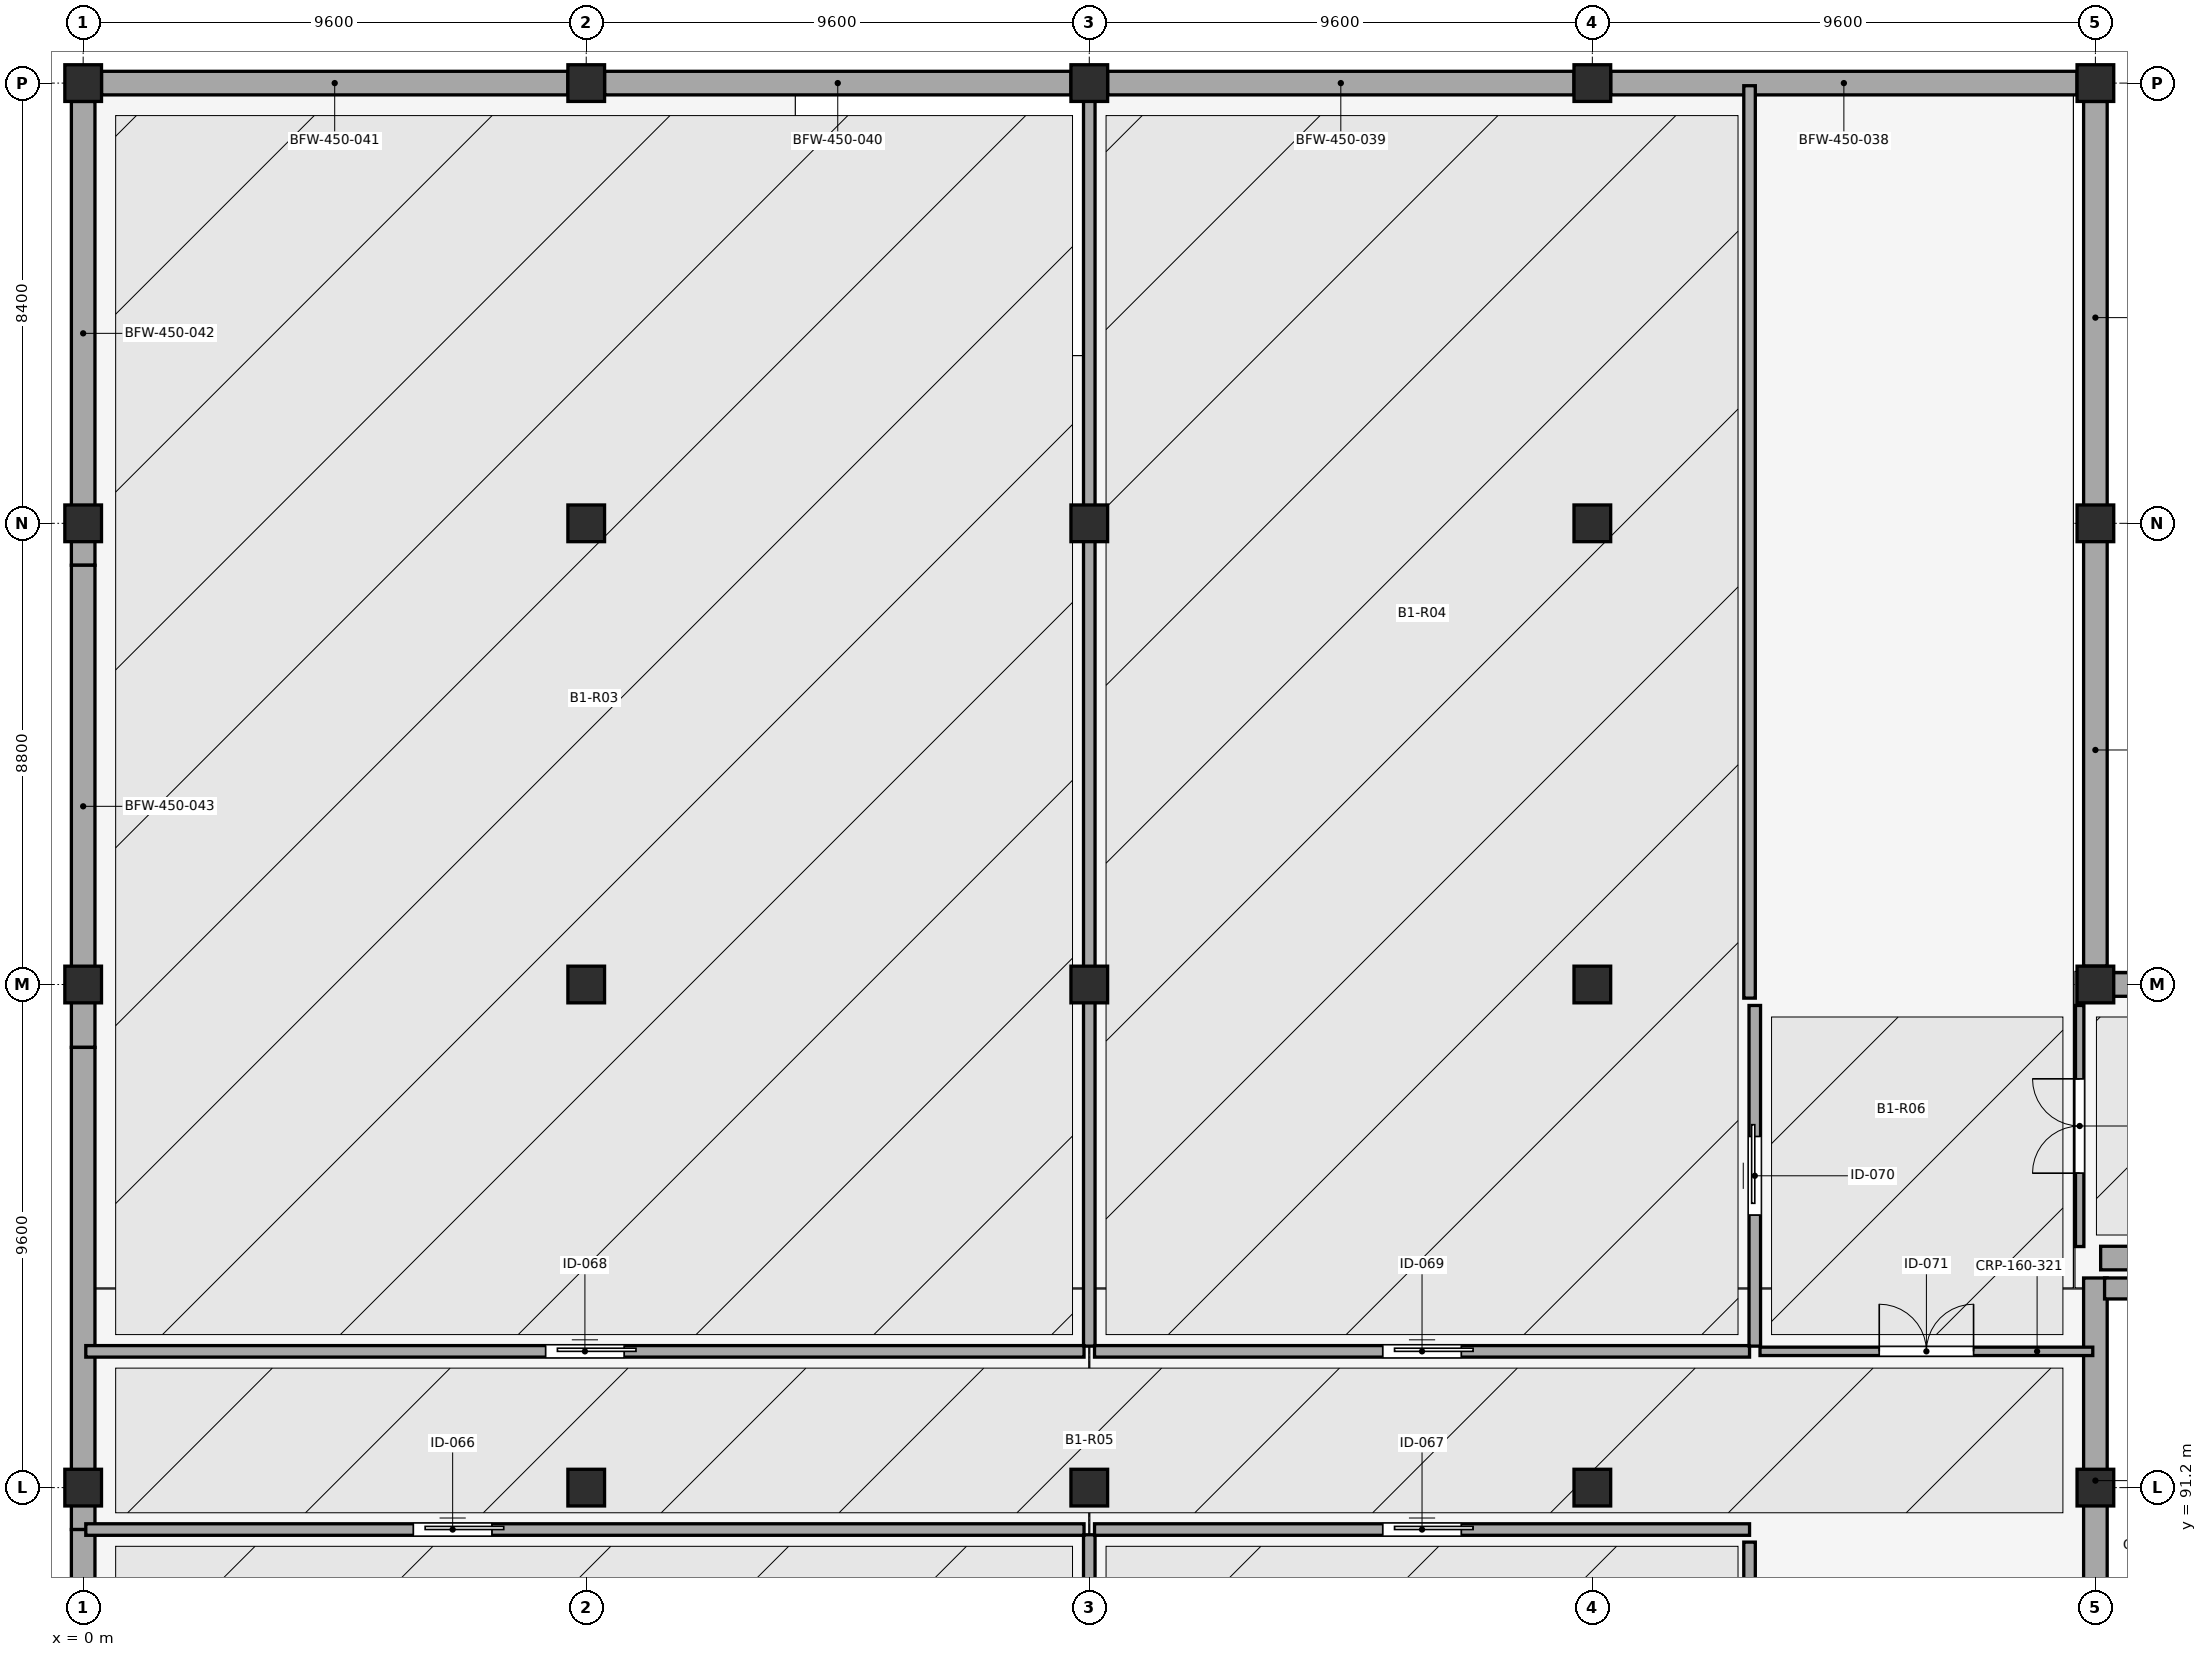
"""IFC4 building model, lengths in metres.
Left out: names, types, materials, properties, quantities, classifications, styles, units other than length and angle.
Written with IfcOpenShell. Run it as: python <this file> out.ifc"""

import sys

from ifc_helpers import new_model, si_unit, direction, frame, frame_2d, origin, origin_2d, place, context, subcontext, project, spatial, rectangle, extrude, element, fill, save


model = new_model("IFC4")
c1 = context("Model", 3, precision=1e-05, world=origin(), true_north=direction((0.0, 1.0)))
c2 = subcontext(c1, "Body", "Model", "MODEL_VIEW")
j1 = project(units=[si_unit("LENGTHUNIT", "METRE"), si_unit("PLANEANGLEUNIT", "RADIAN")], contexts=[c1])
p1 = place(None, origin())
s1 = spatial("IfcSite", under=j1, at=p1, CompositionType="ELEMENT")
p2 = place(p1, origin())
s2 = spatial("IfcBuilding", under=s1, at=p2, CompositionType="ELEMENT")
p3 = place(p2, frame((0.0, 0.0, -4.2)))
s3 = spatial("IfcBuildingStorey", under=s2, at=p3, CompositionType="ELEMENT", Elevation=-4.2)
for number, where, z_axis, x_axis in (
    (1, (0.0, 91.2, 0.0), (0.0, 0.0, 1.0), (1.0, 0.0, 0.0)),
    (2, (0.0, 100.8, 0.0), (0.0, 0.0, 1.0), (1.0, 0.0, 0.0)),
    (3, (0.0, 109.6, 0.0), (0.0, 0.0, 1.0), (1.0, 0.0, 0.0)),
    (4, (0.0, 118.0, 0.0), (0.0, 0.0, 1.0), (1.0, 0.0, 0.0)),
    (5, (9.6, 91.2, 0.0), (0.0, 0.0, 1.0), (1.0, 0.0, 0.0)),
    (6, (9.6, 100.8, 0.0), (0.0, 0.0, 1.0), (1.0, 0.0, 0.0)),
    (7, (9.6, 109.6, 0.0), (0.0, 0.0, 1.0), (1.0, 0.0, 0.0)),
    (8, (9.6, 118.0, 0.0), (0.0, 0.0, 1.0), (1.0, 0.0, 0.0)),
    (9, (19.2, 91.2, 0.0), (0.0, 0.0, 1.0), (1.0, 0.0, 0.0)),
    (10, (19.2, 100.8, 0.0), (0.0, 0.0, 1.0), (1.0, 0.0, 0.0)),
    (11, (19.2, 109.6, 0.0), (0.0, 0.0, 1.0), (1.0, 0.0, 0.0)),
    (12, (19.2, 118.0, 0.0), (0.0, 0.0, 1.0), (1.0, 0.0, 0.0)),
    (13, (28.8, 91.2, 0.0), (0.0, 0.0, 1.0), (1.0, 0.0, 0.0)),
    (14, (28.8, 100.8, 0.0), (0.0, 0.0, 1.0), (1.0, 0.0, 0.0)),
    (15, (28.8, 109.6, 0.0), (0.0, 0.0, 1.0), (1.0, 0.0, 0.0)),
    (16, (28.8, 118.0, 0.0), (0.0, 0.0, 1.0), (1.0, 0.0, 0.0)),
    (17, (38.4, 91.2, 0.0), (0.0, 0.0, 1.0), (1.0, 0.0, 0.0)),
    (18, (38.4, 100.8, 0.0), (0.0, 0.0, 1.0), (1.0, 0.0, 0.0)),
    (19, (38.4, 109.6, 0.0), (0.0, 0.0, 1.0), (1.0, 0.0, 0.0)),
    (20, (38.4, 118.0, 0.0), (0.0, 0.0, 1.0), (1.0, 0.0, 0.0)),
):
    element("IfcColumn", number, at=place(p3, frame(where, z_axis=z_axis, x_axis=x_axis)), inside=s3, PredefinedType="COLUMN", context=c2, shape_type="SweptSolid", body=[
        extrude(rectangle(XDim=0.7, YDim=0.7, at=origin_2d()), origin(), (0.0, 0.0, 1.0), 4.2),
    ])
p4 = place(p3, frame((38.4, 87.467, 0.0), z_axis=(0.0, 0.0, 1.0), x_axis=(0.0, 1.0, 0.0)))
e21 = element("IfcWall", 21, at=p4, inside=s3, PredefinedType="SOLIDWALL", context=c2, shape_type="SweptSolid", body=[
    extrude(rectangle(XDim=7.733, YDim=0.45, at=frame_2d((3.866, 0.0))), origin(), (0.0, 0.0, 1.0), 3.84),
])
for number, where, z_axis, x_axis in (
    (22, (38.4, 101.15, 0.0), (0.0, 0.0, 1.0), (0.0, 1.0, 0.0)),
    (23, (38.4, 109.4, 0.0), (0.0, 0.0, 1.0), (0.0, 1.0, 0.0)),
):
    element("IfcWall", number, at=place(p3, frame(where, z_axis=z_axis, x_axis=x_axis)), inside=s3, PredefinedType="SOLIDWALL", context=c2, shape_type="SweptSolid", body=[
        extrude(rectangle(XDim=8.25, YDim=0.45, at=frame_2d((4.125, 0.0))), origin(), (0.0, 0.0, 1.0), 3.84),
    ])
p5 = place(p3, frame((38.05, 118.0, 0.0), z_axis=(0.0, 0.0, 1.0), x_axis=(-1.0, 0.0, 0.0)))
e24 = element("IfcWall", 24, at=p5, inside=s3, PredefinedType="SOLIDWALL", context=c2, shape_type="SweptSolid", body=[
    extrude(rectangle(XDim=8.9, YDim=0.45, at=frame_2d((4.45, 0.0))), origin(), (0.0, 0.0, 1.0), 3.84),
])
p6 = place(p3, frame((28.45, 118.0, 0.0), z_axis=(0.0, 0.0, 1.0), x_axis=(-1.0, 0.0, 0.0)))
e25 = element("IfcWall", 25, at=p6, inside=s3, PredefinedType="SOLIDWALL", context=c2, shape_type="SweptSolid", body=[
    extrude(rectangle(XDim=8.9, YDim=0.45, at=frame_2d((4.45, 0.0))), origin(), (0.0, 0.0, 1.0), 3.84),
])
p7 = place(p3, frame((18.85, 118.0, 0.0), z_axis=(0.0, 0.0, 1.0), x_axis=(-1.0, 0.0, 0.0)))
e26 = element("IfcWall", 26, at=p7, inside=s3, PredefinedType="SOLIDWALL", context=c2, shape_type="SweptSolid", body=[
    extrude(rectangle(XDim=8.9, YDim=0.45, at=frame_2d((4.45, 0.0))), origin(), (0.0, 0.0, 1.0), 3.84),
])
p8 = place(p3, frame((9.25, 118.0, 0.0), z_axis=(0.0, 0.0, 1.0), x_axis=(-1.0, 0.0, 0.0)))
e27 = element("IfcWall", 27, at=p8, inside=s3, PredefinedType="SOLIDWALL", context=c2, shape_type="SweptSolid", body=[
    extrude(rectangle(XDim=8.9, YDim=0.45, at=frame_2d((4.45, 0.0))), origin(), (0.0, 0.0, 1.0), 3.84),
])
p9 = place(p3, frame((0.0, 117.65, 0.0), z_axis=(0.0, 0.0, 1.0), x_axis=(0.0, -1.0, 0.0)))
e28 = element("IfcWall", 28, at=p9, inside=s3, PredefinedType="SOLIDWALL", context=c2, shape_type="SweptSolid", body=[
    extrude(rectangle(XDim=8.85, YDim=0.45, at=frame_2d((4.425, 0.0))), origin(), (0.0, 0.0, 1.0), 3.84),
])
p10 = place(p3, frame((0.0, 108.8, 0.0), z_axis=(0.0, 0.0, 1.0), x_axis=(0.0, -1.0, 0.0)))
e29 = element("IfcWall", 29, at=p10, inside=s3, PredefinedType="SOLIDWALL", context=c2, shape_type="SweptSolid", body=[
    extrude(rectangle(XDim=9.2, YDim=0.45, at=frame_2d((4.6, 0.0))), origin(), (0.0, 0.0, 1.0), 3.84),
])
p11 = place(p3, frame((0.0, 99.6, 0.0), z_axis=(0.0, 0.0, 1.0), x_axis=(0.0, -1.0, 0.0)))
e30 = element("IfcWall", 30, at=p11, inside=s3, PredefinedType="SOLIDWALL", context=c2, shape_type="SweptSolid", body=[
    extrude(rectangle(XDim=9.2, YDim=0.45, at=frame_2d((4.6, 0.0))), origin(), (0.0, 0.0, 1.0), 3.84),
])
p12 = place(p3, frame((0.0, 90.4, 0.0), z_axis=(0.0, 0.0, 1.0), x_axis=(0.0, -1.0, 0.0)))
e31 = element("IfcWall", 31, at=p12, inside=s3, PredefinedType="SOLIDWALL", context=c2, shape_type="SweptSolid", body=[
    extrude(rectangle(XDim=9.2, YDim=0.45, at=frame_2d((4.6, 0.0))), origin(), (0.0, 0.0, 1.0), 3.84),
])
for number, where, z_axis, x_axis in (
    (32, (38.5, 95.58, 0.0), (0.0, 0.0, 1.0), (1.0, 0.0, 0.0)),
    (33, (38.5, 100.8, 0.0), (0.0, 0.0, 1.0), (1.0, 0.0, 0.0)),
):
    element("IfcWall", number, at=place(p3, frame(where, z_axis=z_axis, x_axis=x_axis)), inside=s3, PredefinedType="SOLIDWALL", context=c2, shape_type="SweptSolid", body=[
        extrude(rectangle(XDim=9.4, YDim=0.45, at=frame_2d((4.7, 0.0))), origin(), (0.0, 0.0, 1.0), 3.84),
    ])
p13 = place(p3, frame((38.575, 95.0, 0.0), z_axis=(0.0, 0.0, 1.0), x_axis=(1.0, 0.0, 0.0)))
e34 = element("IfcWall", 34, at=p13, inside=s3, PredefinedType="SOLIDWALL", context=c2, shape_type="SweptSolid", body=[
    extrude(rectangle(XDim=9.25, YDim=0.4, at=frame_2d((4.625, 0.0))), origin(), (0.0, 0.0, 1.0), 9.0),
])
p14 = place(p3, frame((19.2, 72.05, 0.0), z_axis=(0.0, 0.0, 1.0), x_axis=(0.0, 1.0, 0.0)))
e35 = element("IfcWall", 35, at=p14, inside=s3, PredefinedType="PARTITIONING", context=c2, shape_type="SweptSolid", body=[
    extrude(rectangle(XDim=18.25, YDim=0.22, at=frame_2d((9.125, 0.0))), origin(), (0.0, 0.0, 1.0), 2.952),
])
p15 = place(p3, frame((0.05, 90.4, 0.0), z_axis=(0.0, 0.0, 1.0), x_axis=(1.0, 0.0, 0.0)))
e36 = element("IfcWall", 36, at=p15, inside=s3, PredefinedType="PARTITIONING", context=c2, shape_type="SweptSolid", body=[
    extrude(rectangle(XDim=19.05, YDim=0.22, at=frame_2d((9.525, 0.0))), origin(), (0.0, 0.0, 1.0), 3.84),
])
p16 = place(p15, frame((6.251, 0.0, 0.0)))
e37 = element("IfcOpeningElement", 37, at=p16, cuts=e36, PredefinedType="OPENING", context=c2, shape_type="SweptSolid", body=[
    extrude(rectangle(XDim=1.5, YDim=2.2, at=frame_2d((0.75, 1.1))), frame((0.0, 0.12, 0.0), z_axis=(0.0, -1.0, 0.0), x_axis=(1.0, 0.0, 0.0)), (0.0, 0.0, 1.0), 0.24),
])
p17 = place(p3, frame((19.3, 90.4, 0.0), z_axis=(0.0, 0.0, 1.0), x_axis=(1.0, 0.0, 0.0)))
e38 = element("IfcWall", 38, at=p17, inside=s3, PredefinedType="PARTITIONING", context=c2, shape_type="SweptSolid", body=[
    extrude(rectangle(XDim=12.5, YDim=0.22, at=frame_2d((6.25, 0.0))), origin(), (0.0, 0.0, 1.0), 3.84),
])
p18 = place(p17, frame((5.5, 0.0, 0.0)))
e39 = element("IfcOpeningElement", 39, at=p18, cuts=e38, PredefinedType="OPENING", context=c2, shape_type="SweptSolid", body=[
    extrude(rectangle(XDim=1.5, YDim=2.2, at=frame_2d((0.75, 1.1))), frame((0.0, 0.12, 0.0), z_axis=(0.0, -1.0, 0.0), x_axis=(1.0, 0.0, 0.0)), (0.0, 0.0, 1.0), 0.24),
])
p19 = place(p3, frame((19.2, 93.9, 0.0), z_axis=(0.0, 0.0, 1.0), x_axis=(0.0, 1.0, 0.0)))
e40 = element("IfcWall", 40, at=p19, inside=s3, PredefinedType="PARTITIONING", context=c2, shape_type="SweptSolid", body=[
    extrude(rectangle(XDim=24.05, YDim=0.22, at=frame_2d((12.025, 0.0))), origin(), (0.0, 0.0, 1.0), 2.952),
])
p20 = place(p3, frame((0.05, 93.8, 0.0), z_axis=(0.0, 0.0, 1.0), x_axis=(1.0, 0.0, 0.0)))
e41 = element("IfcWall", 41, at=p20, inside=s3, PredefinedType="PARTITIONING", context=c2, shape_type="SweptSolid", body=[
    extrude(rectangle(XDim=19.05, YDim=0.22, at=frame_2d((9.525, 0.0))), origin(), (0.0, 0.0, 1.0), 3.84),
])
p21 = place(p20, frame((8.775, 0.0, 0.0)))
e42 = element("IfcOpeningElement", 42, at=p21, cuts=e41, PredefinedType="OPENING", context=c2, shape_type="SweptSolid", body=[
    extrude(rectangle(XDim=1.5, YDim=2.2, at=frame_2d((0.75, 1.1))), frame((0.0, 0.12, 0.0), z_axis=(0.0, -1.0, 0.0), x_axis=(1.0, 0.0, 0.0)), (0.0, 0.0, 1.0), 0.24),
])
p22 = place(p3, frame((19.3, 93.8, 0.0), z_axis=(0.0, 0.0, 1.0), x_axis=(1.0, 0.0, 0.0)))
e43 = element("IfcWall", 43, at=p22, inside=s3, PredefinedType="PARTITIONING", context=c2, shape_type="SweptSolid", body=[
    extrude(rectangle(XDim=12.5, YDim=0.22, at=frame_2d((6.25, 0.0))), origin(), (0.0, 0.0, 1.0), 3.84),
])
p23 = place(p22, frame((5.5, 0.0, 0.0)))
e44 = element("IfcOpeningElement", 44, at=p23, cuts=e43, PredefinedType="OPENING", context=c2, shape_type="SweptSolid", body=[
    extrude(rectangle(XDim=1.5, YDim=2.2, at=frame_2d((0.75, 1.1))), frame((0.0, 0.12, 0.0), z_axis=(0.0, -1.0, 0.0), x_axis=(1.0, 0.0, 0.0)), (0.0, 0.0, 1.0), 0.24),
])
p24 = place(p3, frame((31.9, 93.9, 0.0), z_axis=(0.0, 0.0, 1.0), x_axis=(0.0, 1.0, 0.0)))
e45 = element("IfcWall", 45, at=p24, inside=s3, PredefinedType="PARTITIONING", context=c2, shape_type="SweptSolid", body=[
    extrude(rectangle(XDim=6.5, YDim=0.22, at=frame_2d((3.25, 0.0))), origin(), (0.0, 0.0, 1.0), 3.84),
])
p25 = place(p24, frame((2.5, 0.0, 0.0)))
e46 = element("IfcOpeningElement", 46, at=p25, cuts=e45, PredefinedType="OPENING", context=c2, shape_type="SweptSolid", body=[
    extrude(rectangle(XDim=1.5, YDim=2.2, at=frame_2d((0.75, 1.1))), frame((0.0, 0.12, 0.0), z_axis=(0.0, -1.0, 0.0), x_axis=(1.0, 0.0, 0.0)), (0.0, 0.0, 1.0), 0.24),
])
p26 = place(p3, frame((32.0, 93.8, 0.0), z_axis=(0.0, 0.0, 1.0), x_axis=(1.0, 0.0, 0.0)))
e47 = element("IfcWall", 47, at=p26, inside=s3, PredefinedType="PARTITIONING", context=c2, shape_type="SweptSolid", body=[
    extrude(rectangle(XDim=6.35, YDim=0.16, at=frame_2d((3.175, 0.0))), origin(), (0.0, 0.0, 1.0), 3.84),
])
p27 = place(p26, frame((2.275, 0.0, 0.0)))
e48 = element("IfcOpeningElement", 48, at=p27, cuts=e47, PredefinedType="OPENING", context=c2, shape_type="SweptSolid", body=[
    extrude(rectangle(XDim=1.8, YDim=2.15, at=frame_2d((0.9, 1.075))), frame((0.0, 0.09, 0.0), z_axis=(0.0, -1.0, 0.0), x_axis=(1.0, 0.0, 0.0)), (0.0, 0.0, 1.0), 0.18),
])
p28 = place(p3, frame((38.1, 95.8, 0.0), z_axis=(0.0, 0.0, 1.0), x_axis=(0.0, 1.0, 0.0)))
e49 = element("IfcWall", 49, at=p28, inside=s3, PredefinedType="PARTITIONING", context=c2, shape_type="SweptSolid", body=[
    extrude(rectangle(XDim=4.6, YDim=0.16, at=frame_2d((2.3, 0.0))), origin(), (0.0, 0.0, 1.0), 3.84),
])
p29 = place(p28, frame((1.4, 0.0, 0.0)))
e50 = element("IfcOpeningElement", 50, at=p29, cuts=e49, PredefinedType="OPENING", context=c2, shape_type="SweptSolid", body=[
    extrude(rectangle(XDim=1.8, YDim=2.15, at=frame_2d((0.9, 1.075))), frame((0.0, 0.09, 0.0), z_axis=(0.0, -1.0, 0.0), x_axis=(1.0, 0.0, 0.0)), (0.0, 0.0, 1.0), 0.18),
])
p30 = place(p3, frame((31.8, 78.265, 0.0), z_axis=(0.0, 0.0, 1.0), x_axis=(0.0, 1.0, 0.0)))
e51 = element("IfcWall", 51, at=p30, inside=s3, PredefinedType="PARTITIONING", context=c2, shape_type="SweptSolid", body=[
    extrude(rectangle(XDim=11.895, YDim=0.22, at=frame_2d((5.948, 0.0))), origin(), (0.0, 0.0, 1.0), 3.84),
])
p31 = place(p3, frame((31.8, 100.54, 0.0), z_axis=(0.0, 0.0, 1.0), x_axis=(0.0, 1.0, 0.0)))
e52 = element("IfcWall", 52, at=p31, inside=s3, PredefinedType="PARTITIONING", context=c2, shape_type="SweptSolid", body=[
    extrude(rectangle(XDim=17.41, YDim=0.22, at=frame_2d((8.705, 0.0))), origin(), (0.0, 0.0, 1.0), 3.84),
])
p32 = place(p16, origin())
e53 = element("IfcDoor", 53, at=p32, inside=s3, OperationType="SLIDING_TO_RIGHT", PredefinedType="DOOR", context=c2, shape_type="SweptSolid", body=[
    extrude(rectangle(XDim=1.5, YDim=2.2, at=frame_2d((0.75, 1.1))), frame((0.0, 0.025, 0.0), z_axis=(0.0, -1.0, 0.0), x_axis=(1.0, 0.0, 0.0)), (0.0, 0.0, 1.0), 0.05),
])
fill(e37, e53)
p33 = place(p18, origin())
e54 = element("IfcDoor", 54, at=p33, inside=s3, OperationType="SLIDING_TO_RIGHT", PredefinedType="DOOR", context=c2, shape_type="SweptSolid", body=[
    extrude(rectangle(XDim=1.5, YDim=2.2, at=frame_2d((0.75, 1.1))), frame((0.0, 0.025, 0.0), z_axis=(0.0, -1.0, 0.0), x_axis=(1.0, 0.0, 0.0)), (0.0, 0.0, 1.0), 0.05),
])
fill(e39, e54)
p34 = place(p21, origin())
e55 = element("IfcDoor", 55, at=p34, inside=s3, OperationType="SLIDING_TO_RIGHT", PredefinedType="DOOR", context=c2, shape_type="SweptSolid", body=[
    extrude(rectangle(XDim=1.5, YDim=2.2, at=frame_2d((0.75, 1.1))), frame((0.0, 0.025, 0.0), z_axis=(0.0, -1.0, 0.0), x_axis=(1.0, 0.0, 0.0)), (0.0, 0.0, 1.0), 0.05),
])
fill(e42, e55)
p35 = place(p23, origin())
e56 = element("IfcDoor", 56, at=p35, inside=s3, OperationType="SLIDING_TO_RIGHT", PredefinedType="DOOR", context=c2, shape_type="SweptSolid", body=[
    extrude(rectangle(XDim=1.5, YDim=2.2, at=frame_2d((0.75, 1.1))), frame((0.0, 0.025, 0.0), z_axis=(0.0, -1.0, 0.0), x_axis=(1.0, 0.0, 0.0)), (0.0, 0.0, 1.0), 0.05),
])
fill(e44, e56)
p36 = place(p25, origin())
e57 = element("IfcDoor", 57, at=p36, inside=s3, OperationType="SLIDING_TO_RIGHT", PredefinedType="DOOR", context=c2, shape_type="SweptSolid", body=[
    extrude(rectangle(XDim=1.5, YDim=2.2, at=frame_2d((0.75, 1.1))), frame((0.0, 0.025, 0.0), z_axis=(0.0, -1.0, 0.0), x_axis=(1.0, 0.0, 0.0)), (0.0, 0.0, 1.0), 0.05),
])
fill(e46, e57)
p37 = place(p27, origin())
e58 = element("IfcDoor", 58, at=p37, inside=s3, OperationType="DOUBLE_DOOR_SINGLE_SWING", PredefinedType="DOOR", context=c2, shape_type="SweptSolid", body=[
    extrude(rectangle(XDim=1.8, YDim=2.15, at=frame_2d((0.9, 1.075))), frame((0.0, 0.025, 0.0), z_axis=(0.0, -1.0, 0.0), x_axis=(1.0, 0.0, 0.0)), (0.0, 0.0, 1.0), 0.05),
])
fill(e48, e58)
p38 = place(p29, origin())
e59 = element("IfcDoor", 59, at=p38, inside=s3, OperationType="DOUBLE_DOOR_SINGLE_SWING", PredefinedType="DOOR", context=c2, shape_type="SweptSolid", body=[
    extrude(rectangle(XDim=1.8, YDim=2.15, at=frame_2d((0.9, 1.075))), frame((0.0, 0.025, 0.0), z_axis=(0.0, -1.0, 0.0), x_axis=(1.0, 0.0, 0.0)), (0.0, 0.0, 1.0), 0.05),
])
fill(e50, e59)
save(model, sys.argv[1])
